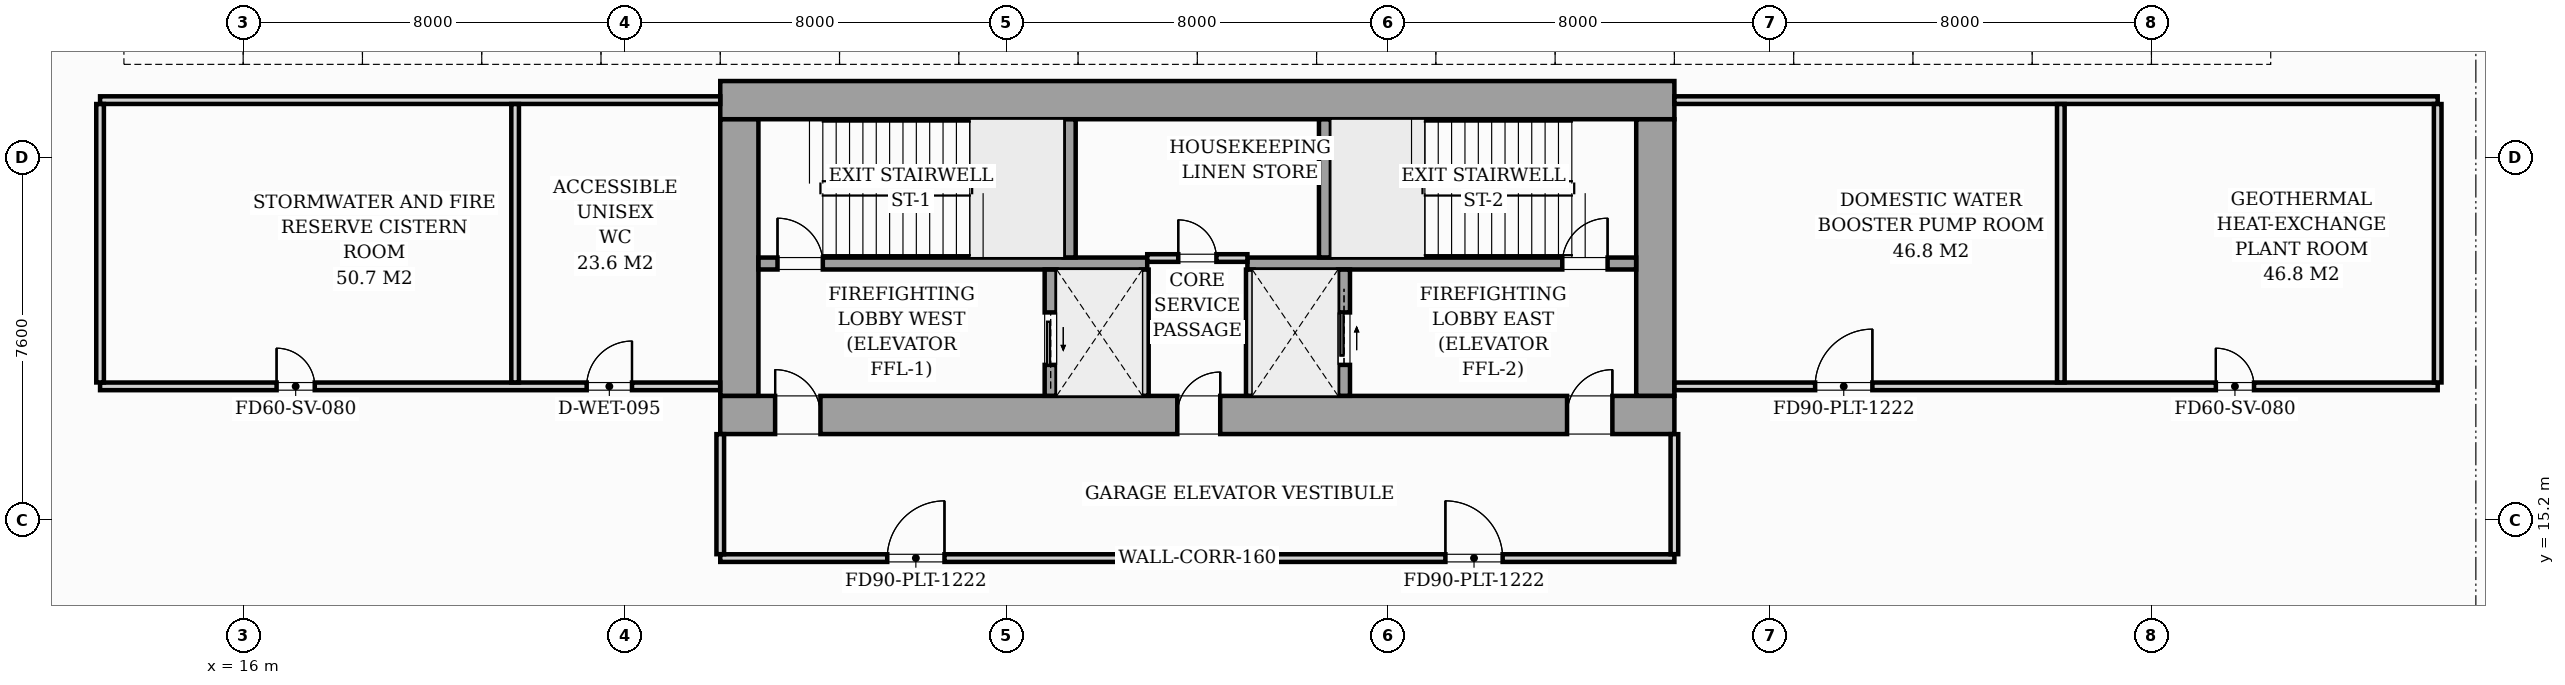
"""IFC4 building model, lengths in metres.
Left out: names, types, materials, properties, quantities, classifications, styles, units other than length and angle.
Written with IfcOpenShell. Run it as: python <this file> out.ifc"""

import sys

from ifc_helpers import new_model, si_unit, direction, frame, frame_2d, origin, origin_2d, place, context, subcontext, project, spatial, rectangle, i_section, extrude, source, transform, mapped, element, fill, save


model = new_model("IFC4")
c1 = context("Model", 3, precision=1e-05, world=origin(), true_north=direction((0.0, 1.0)))
c2 = subcontext(c1, "Body", "Model", "MODEL_VIEW")
j1 = project(units=[si_unit("LENGTHUNIT", "METRE"), si_unit("PLANEANGLEUNIT", "RADIAN")], contexts=[c1])
p1 = place(None, origin())
s1 = spatial("IfcSite", under=j1, at=p1, CompositionType="ELEMENT")
p2 = place(p1, origin())
s2 = spatial("IfcBuilding", under=s1, at=p2, CompositionType="ELEMENT")
p3 = place(p2, frame((0.0, 0.0, -8.4)))
s3 = spatial("IfcBuildingStorey", under=s2, at=p3, CompositionType="ELEMENT", Elevation=-8.4)
m1 = source(origin(), c2, "Body", "SweptSolid", [
    extrude(i_section(OverallWidth=0.437, OverallDepth=0.514, WebThickness=0.061, FlangeThickness=0.097, FilletRadius=0.018, at=origin_2d()), origin(), (0.0, 0.0, 1.0), 4.198),
])
for number, where, z_axis, x_axis in (
    (1, (26.4, 17.4, 0.0), (0.0, 0.0, 1.0), (1.0, 0.0, 0.0)),
    (2, (33.12, 17.4, 0.0), (0.0, 0.0, 1.0), (1.0, 0.0, 0.0)),
    (3, (38.88, 17.4, 0.0), (0.0, 0.0, 1.0), (1.0, 0.0, 0.0)),
    (4, (45.6, 17.4, 0.0), (0.0, 0.0, 1.0), (1.0, 0.0, 0.0)),
    (5, (26.4, 24.0, 0.0), (0.0, 0.0, 1.0), (1.0, 0.0, 0.0)),
    (6, (33.12, 24.0, 0.0), (0.0, 0.0, 1.0), (1.0, 0.0, 0.0)),
    (7, (38.88, 24.0, 0.0), (0.0, 0.0, 1.0), (1.0, 0.0, 0.0)),
    (8, (45.6, 24.0, 0.0), (0.0, 0.0, 1.0), (1.0, 0.0, 0.0)),
):
    element("IfcColumn", number, at=place(p3, frame(where, z_axis=z_axis, x_axis=x_axis)), inside=s3, PredefinedType="PILASTER", context=c2, shape_type="MappedRepresentation", body=[
        mapped(m1, transform((0.0, 0.0, 0.0), scale=1.0)),
    ])
p4 = place(p3, frame((26.0, 17.4, 0.0), z_axis=(0.0, 0.0, 1.0), x_axis=(1.0, 0.0, 0.0)))
e9 = element("IfcWall", 9, at=p4, inside=s3, PredefinedType="SHEAR", context=c2, shape_type="SweptSolid", body=[
    extrude(rectangle(XDim=20.0, YDim=0.8, at=frame_2d((10.0, 0.0))), origin(), (0.0, 0.0, 1.0), 4.2),
])
p5 = place(p4, frame((1.15, 0.0, 0.0)))
e10 = element("IfcOpeningElement", 10, at=p5, cuts=e9, PredefinedType="OPENING", context=c2, shape_type="SweptSolid", body=[
    extrude(rectangle(XDim=0.95, YDim=2.06, at=frame_2d((0.475, 1.03))), frame((0.0, 0.41, 0.0), z_axis=(0.0, -1.0, 0.0), x_axis=(1.0, 0.0, 0.0)), (0.0, 0.0, 1.0), 0.82),
])
p6 = place(p4, frame((9.58, 0.0, 0.0)))
e11 = element("IfcOpeningElement", 11, at=p6, cuts=e9, PredefinedType="OPENING", context=c2, shape_type="SweptSolid", body=[
    extrude(rectangle(XDim=0.9, YDim=2.06, at=frame_2d((0.45, 1.03))), frame((0.0, 0.41, 0.0), z_axis=(0.0, -1.0, 0.0), x_axis=(1.0, 0.0, 0.0)), (0.0, 0.0, 1.0), 0.82),
])
p7 = place(p4, frame((17.75, 0.0, 0.0)))
e12 = element("IfcOpeningElement", 12, at=p7, cuts=e9, PredefinedType="OPENING", context=c2, shape_type="SweptSolid", body=[
    extrude(rectangle(XDim=0.95, YDim=2.06, at=frame_2d((0.475, 1.03))), frame((0.0, 0.41, 0.0), z_axis=(0.0, -1.0, 0.0), x_axis=(1.0, 0.0, 0.0)), (0.0, 0.0, 1.0), 0.82),
])
p8 = place(p3, frame((26.0, 24.0, 0.0), z_axis=(0.0, 0.0, 1.0), x_axis=(1.0, 0.0, 0.0)))
e13 = element("IfcWall", 13, at=p8, inside=s3, PredefinedType="SHEAR", context=c2, shape_type="SweptSolid", body=[
    extrude(rectangle(XDim=20.0, YDim=0.8, at=frame_2d((10.0, 0.0))), origin(), (0.0, 0.0, 1.0), 4.2),
])
for number, where, z_axis, x_axis in (
    (14, (26.4, 17.802, 0.0), (0.0, 0.0, 1.0), (0.0, 1.0, 0.0)),
    (15, (45.6, 17.802, 0.0), (0.0, 0.0, 1.0), (0.0, 1.0, 0.0)),
):
    element("IfcWall", number, at=place(p3, frame(where, z_axis=z_axis, x_axis=x_axis)), inside=s3, PredefinedType="SHEAR", context=c2, shape_type="SweptSolid", body=[
        extrude(rectangle(XDim=5.796, YDim=0.8, at=frame_2d((2.898, 0.0))), origin(), (0.0, 0.0, 1.0), 4.2),
    ])
p9 = place(p3, frame((26.802, 20.575, 0.0), z_axis=(0.0, 0.0, 1.0), x_axis=(1.0, 0.0, 0.0)))
e16 = element("IfcWall", 16, at=p9, inside=s3, PredefinedType="SOLIDWALL", context=c2, shape_type="SweptSolid", body=[
    extrude(rectangle(XDim=8.148, YDim=0.25, at=frame_2d((4.074, 0.0))), origin(), (0.0, 0.0, 1.0), 4.2),
])
p10 = place(p9, frame((0.398, 0.0, 0.0)))
e17 = element("IfcOpeningElement", 17, at=p10, cuts=e16, PredefinedType="OPENING", context=c2, shape_type="SweptSolid", body=[
    extrude(rectangle(XDim=0.95, YDim=2.06, at=frame_2d((0.475, 1.03))), frame((0.0, 0.135, 0.0), z_axis=(0.0, -1.0, 0.0), x_axis=(1.0, 0.0, 0.0)), (0.0, 0.0, 1.0), 0.27),
])
p11 = place(p3, frame((37.05, 20.575, 0.0), z_axis=(0.0, 0.0, 1.0), x_axis=(1.0, 0.0, 0.0)))
e18 = element("IfcWall", 18, at=p11, inside=s3, PredefinedType="SOLIDWALL", context=c2, shape_type="SweptSolid", body=[
    extrude(rectangle(XDim=8.148, YDim=0.25, at=frame_2d((4.074, 0.0))), origin(), (0.0, 0.0, 1.0), 4.2),
])
p12 = place(p11, frame((6.6, 0.0, 0.0)))
e19 = element("IfcOpeningElement", 19, at=p12, cuts=e18, PredefinedType="OPENING", context=c2, shape_type="SweptSolid", body=[
    extrude(rectangle(XDim=0.95, YDim=2.06, at=frame_2d((0.475, 1.03))), frame((0.0, 0.135, 0.0), z_axis=(0.0, -1.0, 0.0), x_axis=(1.0, 0.0, 0.0)), (0.0, 0.0, 1.0), 0.27),
])
for number, where, z_axis, x_axis in (
    (20, (33.325, 20.702, 0.0), (0.0, 0.0, 1.0), (0.0, 1.0, 0.0)),
    (21, (38.675, 20.702, 0.0), (0.0, 0.0, 1.0), (0.0, 1.0, 0.0)),
):
    element("IfcWall", number, at=place(p3, frame(where, z_axis=z_axis, x_axis=x_axis)), inside=s3, PredefinedType="SOLIDWALL", context=c2, shape_type="SweptSolid", body=[
        extrude(rectangle(XDim=2.896, YDim=0.25, at=frame_2d((1.448, 0.0))), origin(), (0.0, 0.0, 1.0), 4.2),
    ])
p13 = place(p3, frame((32.925, 17.802, 0.0), z_axis=(0.0, 0.0, 1.0), x_axis=(0.0, 1.0, 0.0)))
e22 = element("IfcWall", 22, at=p13, inside=s3, PredefinedType="SOLIDWALL", context=c2, shape_type="SweptSolid", body=[
    extrude(rectangle(XDim=2.646, YDim=0.25, at=frame_2d((1.323, 0.0))), origin(), (0.0, 0.0, 1.0), 4.2),
])
p14 = place(p13, frame((0.648, 0.0, 0.0)))
e23 = element("IfcOpeningElement", 23, at=p14, cuts=e22, PredefinedType="OPENING", context=c2, shape_type="SweptSolid", body=[
    extrude(rectangle(XDim=1.1, YDim=2.08, at=frame_2d((0.55, 1.04))), frame((0.0, 0.135, 0.0), z_axis=(0.0, -1.0, 0.0), x_axis=(1.0, 0.0, 0.0)), (0.0, 0.0, 1.0), 0.27),
])
for number, where, z_axis, x_axis in (
    (24, (34.9, 17.802, 0.0), (0.0, 0.0, 1.0), (0.0, 1.0, 0.0)),
    (25, (37.1, 17.802, 0.0), (0.0, 0.0, 1.0), (0.0, 1.0, 0.0)),
):
    element("IfcWall", number, at=place(p3, frame(where, z_axis=z_axis, x_axis=x_axis)), inside=s3, PredefinedType="PARTITIONING", context=c2, shape_type="SweptSolid", body=[
        extrude(rectangle(XDim=2.646, YDim=0.16, at=frame_2d((1.323, 0.0))), origin(), (0.0, 0.0, 1.0), 3.9),
    ])
p15 = place(p3, frame((39.075, 17.802, 0.0), z_axis=(0.0, 0.0, 1.0), x_axis=(0.0, 1.0, 0.0)))
e26 = element("IfcWall", 26, at=p15, inside=s3, PredefinedType="SOLIDWALL", context=c2, shape_type="SweptSolid", body=[
    extrude(rectangle(XDim=2.646, YDim=0.25, at=frame_2d((1.323, 0.0))), origin(), (0.0, 0.0, 1.0), 4.2),
])
p16 = place(p15, frame((0.648, 0.0, 0.0)))
e27 = element("IfcOpeningElement", 27, at=p16, cuts=e26, PredefinedType="OPENING", context=c2, shape_type="SweptSolid", body=[
    extrude(rectangle(XDim=1.1, YDim=2.08, at=frame_2d((0.55, 1.04))), frame((0.0, 0.135, 0.0), z_axis=(0.0, -1.0, 0.0), x_axis=(1.0, 0.0, 0.0)), (0.0, 0.0, 1.0), 0.27),
])
p17 = place(p3, frame((34.95, 20.69, 0.0), z_axis=(0.0, 0.0, 1.0), x_axis=(1.0, 0.0, 0.0)))
e28 = element("IfcWall", 28, at=p17, inside=s3, PredefinedType="PARTITIONING", context=c2, shape_type="SweptSolid", body=[
    extrude(rectangle(XDim=2.1, YDim=0.16, at=frame_2d((1.05, 0.0))), origin(), (0.0, 0.0, 1.0), 3.9),
])
p18 = place(p17, frame((0.65, 0.0, 0.0)))
e29 = element("IfcOpeningElement", 29, at=p18, cuts=e28, PredefinedType="OPENING", context=c2, shape_type="SweptSolid", body=[
    extrude(rectangle(XDim=0.8, YDim=2.05, at=frame_2d((0.4, 1.025))), frame((0.0, 0.09, 0.0), z_axis=(0.0, -1.0, 0.0), x_axis=(1.0, 0.0, 0.0)), (0.0, 0.0, 1.0), 0.18),
])
p19 = place(p3, frame((26.0, 14.4, 0.0), z_axis=(0.0, 0.0, 1.0), x_axis=(1.0, 0.0, 0.0)))
e30 = element("IfcWall", 30, at=p19, inside=s3, PredefinedType="PARTITIONING", context=c2, shape_type="SweptSolid", body=[
    extrude(rectangle(XDim=20.0, YDim=0.16, at=frame_2d((10.0, 0.0))), origin(), (0.0, 0.0, 1.0), 3.9),
])
p20 = place(p19, frame((3.5, 0.0, 0.0)))
e31 = element("IfcOpeningElement", 31, at=p20, cuts=e30, PredefinedType="OPENING", context=c2, shape_type="SweptSolid", body=[
    extrude(rectangle(XDim=1.2, YDim=2.08, at=frame_2d((0.6, 1.04))), frame((0.0, 0.09, 0.0), z_axis=(0.0, -1.0, 0.0), x_axis=(1.0, 0.0, 0.0)), (0.0, 0.0, 1.0), 0.18),
])
p21 = place(p19, frame((15.2, 0.0, 0.0)))
e32 = element("IfcOpeningElement", 32, at=p21, cuts=e30, PredefinedType="OPENING", context=c2, shape_type="SweptSolid", body=[
    extrude(rectangle(XDim=1.2, YDim=2.08, at=frame_2d((0.6, 1.04))), frame((0.0, 0.09, 0.0), z_axis=(0.0, -1.0, 0.0), x_axis=(1.0, 0.0, 0.0)), (0.0, 0.0, 1.0), 0.18),
])
for number, where, z_axis, x_axis in (
    (33, (26.0, 14.482, 0.0), (0.0, 0.0, 1.0), (0.0, 1.0, 0.0)),
    (34, (46.0, 14.482, 0.0), (0.0, 0.0, 1.0), (0.0, 1.0, 0.0)),
):
    element("IfcWall", number, at=place(p3, frame(where, z_axis=z_axis, x_axis=x_axis)), inside=s3, PredefinedType="PARTITIONING", context=c2, shape_type="SweptSolid", body=[
        extrude(rectangle(XDim=2.516, YDim=0.16, at=frame_2d((1.258, 0.0))), origin(), (0.0, 0.0, 1.0), 3.9),
    ])
p22 = place(p3, frame((13.0, 18.0, 0.0), z_axis=(0.0, 0.0, 1.0), x_axis=(1.0, 0.0, 0.0)))
e35 = element("IfcWall", 35, at=p22, inside=s3, PredefinedType="PARTITIONING", context=c2, shape_type="SweptSolid", body=[
    extrude(rectangle(XDim=12.998, YDim=0.16, at=frame_2d((6.499, 0.0))), origin(), (0.0, 0.0, 1.0), 2.856),
])
p23 = place(p22, frame((10.2, 0.0, 0.0)))
e36 = element("IfcOpeningElement", 36, at=p23, cuts=e35, PredefinedType="OPENING", context=c2, shape_type="SweptSolid", body=[
    extrude(rectangle(XDim=0.95, YDim=2.1, at=frame_2d((0.475, 1.05))), frame((0.0, 0.09, 0.0), z_axis=(0.0, -1.0, 0.0), x_axis=(1.0, 0.0, 0.0)), (0.0, 0.0, 1.0), 0.18),
])
p24 = place(p22, frame((3.7, 0.0, 0.0)))
e37 = element("IfcOpeningElement", 37, at=p24, cuts=e35, PredefinedType="OPENING", context=c2, shape_type="SweptSolid", body=[
    extrude(rectangle(XDim=0.8, YDim=2.05, at=frame_2d((0.4, 1.025))), frame((0.0, 0.09, 0.0), z_axis=(0.0, -1.0, 0.0), x_axis=(1.0, 0.0, 0.0)), (0.0, 0.0, 1.0), 0.18),
])
p25 = place(p3, frame((13.0, 24.0, 0.0), z_axis=(0.0, 0.0, 1.0), x_axis=(1.0, 0.0, 0.0)))
e38 = element("IfcWall", 38, at=p25, inside=s3, PredefinedType="PARTITIONING", context=c2, shape_type="SweptSolid", body=[
    extrude(rectangle(XDim=13.0, YDim=0.16, at=frame_2d((6.5, 0.0))), origin(), (0.0, 0.0, 1.0), 3.9),
])
for number, where, z_axis, x_axis in (
    (39, (13.0, 18.082, 0.0), (0.0, 0.0, 1.0), (0.0, 1.0, 0.0)),
    (40, (21.7, 18.082, 0.0), (0.0, 0.0, 1.0), (0.0, 1.0, 0.0)),
):
    element("IfcWall", number, at=place(p3, frame(where, z_axis=z_axis, x_axis=x_axis)), inside=s3, PredefinedType="PARTITIONING", context=c2, shape_type="SweptSolid", body=[
        extrude(rectangle(XDim=5.836, YDim=0.16, at=frame_2d((2.918, 0.0))), origin(), (0.0, 0.0, 1.0), 3.9),
    ])
p26 = place(p3, frame((46.002, 18.0, 0.0), z_axis=(0.0, 0.0, 1.0), x_axis=(1.0, 0.0, 0.0)))
e41 = element("IfcWall", 41, at=p26, inside=s3, PredefinedType="PARTITIONING", context=c2, shape_type="SweptSolid", body=[
    extrude(rectangle(XDim=15.998, YDim=0.16, at=frame_2d((7.999, 0.0))), origin(), (0.0, 0.0, 1.0), 2.856),
])
p27 = place(p26, frame((2.948, 0.0, 0.0)))
e42 = element("IfcOpeningElement", 42, at=p27, cuts=e41, PredefinedType="OPENING", context=c2, shape_type="SweptSolid", body=[
    extrude(rectangle(XDim=1.2, YDim=2.08, at=frame_2d((0.6, 1.04))), frame((0.0, 0.09, 0.0), z_axis=(0.0, -1.0, 0.0), x_axis=(1.0, 0.0, 0.0)), (0.0, 0.0, 1.0), 0.18),
])
p28 = place(p26, frame((11.348, 0.0, 0.0)))
e43 = element("IfcOpeningElement", 43, at=p28, cuts=e41, PredefinedType="OPENING", context=c2, shape_type="SweptSolid", body=[
    extrude(rectangle(XDim=0.8, YDim=2.05, at=frame_2d((0.4, 1.025))), frame((0.0, 0.09, 0.0), z_axis=(0.0, -1.0, 0.0), x_axis=(1.0, 0.0, 0.0)), (0.0, 0.0, 1.0), 0.18),
])
p29 = place(p3, frame((46.0, 24.0, 0.0), z_axis=(0.0, 0.0, 1.0), x_axis=(1.0, 0.0, 0.0)))
e44 = element("IfcWall", 44, at=p29, inside=s3, PredefinedType="PARTITIONING", context=c2, shape_type="SweptSolid", body=[
    extrude(rectangle(XDim=16.0, YDim=0.16, at=frame_2d((8.0, 0.0))), origin(), (0.0, 0.0, 1.0), 3.9),
])
for number, where, z_axis, x_axis in (
    (45, (62.0, 18.082, 0.0), (0.0, 0.0, 1.0), (0.0, 1.0, 0.0)),
    (46, (54.1, 18.082, 0.0), (0.0, 0.0, 1.0), (0.0, 1.0, 0.0)),
):
    element("IfcWall", number, at=place(p3, frame(where, z_axis=z_axis, x_axis=x_axis)), inside=s3, PredefinedType="PARTITIONING", context=c2, shape_type="SweptSolid", body=[
        extrude(rectangle(XDim=5.836, YDim=0.16, at=frame_2d((2.918, 0.0))), origin(), (0.0, 0.0, 1.0), 3.9),
    ])
m2 = source(origin(), c2, "Body", "SweptSolid", [
    extrude(rectangle(XDim=0.95, YDim=2.06, at=frame_2d((0.475, 1.03))), frame((0.0, 0.025, 0.0), z_axis=(0.0, -1.0, 0.0), x_axis=(1.0, 0.0, 0.0)), (0.0, 0.0, 1.0), 0.05),
])
p30 = place(p5, origin())
e47 = element("IfcDoor", 47, at=p30, inside=s3, OperationType="SINGLE_SWING_LEFT", PredefinedType="DOOR", context=c2, shape_type="MappedRepresentation", body=[
    mapped(m2, transform((0.0, 0.0, 0.0), scale=1.0)),
])
fill(e10, e47)
m3 = source(origin(), c2, "Body", "SweptSolid", [
    extrude(rectangle(XDim=0.9, YDim=2.06, at=frame_2d((0.45, 1.03))), frame((0.0, 0.025, 0.0), z_axis=(0.0, -1.0, 0.0), x_axis=(1.0, 0.0, 0.0)), (0.0, 0.0, 1.0), 0.05),
])
p31 = place(p6, origin())
e48 = element("IfcDoor", 48, at=p31, inside=s3, OperationType="SINGLE_SWING_RIGHT", PredefinedType="DOOR", context=c2, shape_type="MappedRepresentation", body=[
    mapped(m3, transform((0.0, 0.0, 0.0), scale=1.0)),
])
fill(e11, e48)
p32 = place(p7, origin())
e49 = element("IfcDoor", 49, at=p32, inside=s3, OperationType="SINGLE_SWING_RIGHT", PredefinedType="DOOR", context=c2, shape_type="MappedRepresentation", body=[
    mapped(m2, transform((0.0, 0.0, 0.0), scale=1.0)),
])
fill(e12, e49)
p33 = place(p10, origin())
e50 = element("IfcDoor", 50, at=p33, inside=s3, OperationType="SINGLE_SWING_LEFT", PredefinedType="DOOR", context=c2, shape_type="MappedRepresentation", body=[
    mapped(m2, transform((0.0, 0.0, 0.0), scale=1.0)),
])
fill(e17, e50)
p34 = place(p12, origin())
e51 = element("IfcDoor", 51, at=p34, inside=s3, OperationType="SINGLE_SWING_RIGHT", PredefinedType="DOOR", context=c2, shape_type="MappedRepresentation", body=[
    mapped(m2, transform((0.0, 0.0, 0.0), scale=1.0)),
])
fill(e19, e51)
m4 = source(origin(), c2, "Body", "SweptSolid", [
    extrude(rectangle(XDim=1.1, YDim=2.08, at=frame_2d((0.55, 1.04))), frame((0.0, 0.025, 0.0), z_axis=(0.0, -1.0, 0.0), x_axis=(1.0, 0.0, 0.0)), (0.0, 0.0, 1.0), 0.05),
])
p35 = place(p14, origin())
e52 = element("IfcDoor", 52, at=p35, inside=s3, OperationType="SLIDING_TO_LEFT", PredefinedType="DOOR", context=c2, shape_type="MappedRepresentation", body=[
    mapped(m4, transform((0.0, 0.0, 0.0), scale=1.0)),
])
fill(e23, e52)
p36 = place(p16, origin())
e53 = element("IfcDoor", 53, at=p36, inside=s3, OperationType="SLIDING_TO_RIGHT", PredefinedType="DOOR", context=c2, shape_type="MappedRepresentation", body=[
    mapped(m4, transform((0.0, 0.0, 0.0), scale=1.0)),
])
fill(e27, e53)
m5 = source(origin(), c2, "Body", "SweptSolid", [
    extrude(rectangle(XDim=0.8, YDim=2.05, at=frame_2d((0.4, 1.025))), frame((0.0, 0.025, 0.0), z_axis=(0.0, -1.0, 0.0), x_axis=(1.0, 0.0, 0.0)), (0.0, 0.0, 1.0), 0.05),
])
p37 = place(p18, origin())
e54 = element("IfcDoor", 54, at=p37, inside=s3, OperationType="SINGLE_SWING_LEFT", PredefinedType="DOOR", context=c2, shape_type="MappedRepresentation", body=[
    mapped(m5, transform((0.0, 0.0, 0.0), scale=1.0)),
])
fill(e29, e54)
m6 = source(origin(), c2, "Body", "SweptSolid", [
    extrude(rectangle(XDim=1.2, YDim=2.08, at=frame_2d((0.6, 1.04))), frame((0.0, 0.025, 0.0), z_axis=(0.0, -1.0, 0.0), x_axis=(1.0, 0.0, 0.0)), (0.0, 0.0, 1.0), 0.05),
])
p38 = place(p20, origin())
e55 = element("IfcDoor", 55, at=p38, inside=s3, OperationType="SINGLE_SWING_RIGHT", PredefinedType="DOOR", context=c2, shape_type="MappedRepresentation", body=[
    mapped(m6, transform((0.0, 0.0, 0.0), scale=1.0)),
])
fill(e31, e55)
p39 = place(p21, origin())
e56 = element("IfcDoor", 56, at=p39, inside=s3, OperationType="SINGLE_SWING_LEFT", PredefinedType="DOOR", context=c2, shape_type="MappedRepresentation", body=[
    mapped(m6, transform((0.0, 0.0, 0.0), scale=1.0)),
])
fill(e32, e56)
m7 = source(origin(), c2, "Body", "SweptSolid", [
    extrude(rectangle(XDim=0.95, YDim=2.1, at=frame_2d((0.475, 1.05))), frame((0.0, 0.025, 0.0), z_axis=(0.0, -1.0, 0.0), x_axis=(1.0, 0.0, 0.0)), (0.0, 0.0, 1.0), 0.05),
])
p40 = place(p23, origin())
e57 = element("IfcDoor", 57, at=p40, inside=s3, OperationType="SINGLE_SWING_RIGHT", PredefinedType="DOOR", context=c2, shape_type="MappedRepresentation", body=[
    mapped(m7, transform((0.0, 0.0, 0.0), scale=1.0)),
])
fill(e36, e57)
p41 = place(p24, origin())
e58 = element("IfcDoor", 58, at=p41, inside=s3, OperationType="SINGLE_SWING_LEFT", PredefinedType="DOOR", context=c2, shape_type="MappedRepresentation", body=[
    mapped(m5, transform((0.0, 0.0, 0.0), scale=1.0)),
])
fill(e37, e58)
p42 = place(p27, origin())
e59 = element("IfcDoor", 59, at=p42, inside=s3, OperationType="SINGLE_SWING_RIGHT", PredefinedType="DOOR", context=c2, shape_type="MappedRepresentation", body=[
    mapped(m6, transform((0.0, 0.0, 0.0), scale=1.0)),
])
fill(e42, e59)
p43 = place(p28, origin())
e60 = element("IfcDoor", 60, at=p43, inside=s3, OperationType="SINGLE_SWING_LEFT", PredefinedType="DOOR", context=c2, shape_type="MappedRepresentation", body=[
    mapped(m5, transform((0.0, 0.0, 0.0), scale=1.0)),
])
fill(e43, e60)
save(model, sys.argv[1])
